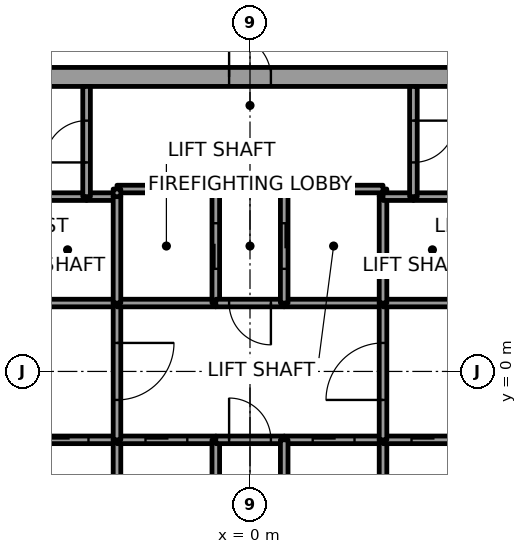
"""IFC4 building model, lengths in metres.
Left out: names, types, materials, properties, quantities, classifications, styles, units other than length and angle.
Written with IfcOpenShell. Run it as: python <this file> out.ifc"""

import sys

from ifc_helpers import new_model, si_unit, direction, frame, frame_2d, origin, place, context, subcontext, project, spatial, rectangle, extrude, element, fill, save


model = new_model("IFC4")
c1 = context("Model", 3, precision=1e-05, world=origin(), true_north=direction((0.0, 1.0)))
c2 = subcontext(c1, "Body", "Model", "MODEL_VIEW")
j1 = project(units=[si_unit("LENGTHUNIT", "METRE"), si_unit("PLANEANGLEUNIT", "RADIAN")], contexts=[c1])
p1 = place(None, origin())
s1 = spatial("IfcSite", under=j1, at=p1, CompositionType="ELEMENT")
p2 = place(p1, origin())
s2 = spatial("IfcBuilding", under=s1, at=p2, CompositionType="ELEMENT")
p3 = place(p2, frame((0.0, 0.0, 133.8)))
s3 = spatial("IfcBuildingStorey", under=s2, at=p3, CompositionType="ELEMENT", Elevation=133.8)
p4 = place(p3, frame((-11.0, 7.75, 0.0), z_axis=(0.0, 0.0, 1.0), x_axis=(1.0, 0.0, 0.0)))
e1 = element("IfcWall", 1, at=p4, inside=s3, PredefinedType="SHEAR", context=c2, shape_type="SweptSolid", body=[
    extrude(rectangle(XDim=22.0, YDim=0.5, at=frame_2d((11.0, 0.0))), origin(), (0.0, 0.0, 1.0), 4.0),
])
p5 = place(p4, frame((10.45, 0.0, 0.0)))
e2 = element("IfcOpeningElement", 2, at=p5, cuts=e1, PredefinedType="OPENING", context=c2, shape_type="SweptSolid", body=[
    extrude(rectangle(XDim=1.1, YDim=2.1, at=frame_2d((0.55, 1.05))), frame((0.0, 0.25, 0.0), z_axis=(0.0, -1.0, 0.0), x_axis=(1.0, 0.0, 0.0)), (0.0, 0.0, 1.0), 0.5),
])
p6 = place(p3, frame((-6.1, -1.8, 0.0), z_axis=(0.0, 0.0, 1.0), x_axis=(1.0, 0.0, 0.0)))
e3 = element("IfcWall", 3, at=p6, inside=s3, PredefinedType="SOLIDWALL", context=c2, shape_type="SweptSolid", body=[
    extrude(rectangle(XDim=2.6, YDim=0.2, at=frame_2d((1.3, 0.0))), origin(), (0.0, 0.0, 1.0), 3.85),
])
p7 = place(p6, frame((0.75, 0.0, 0.0)))
e4 = element("IfcOpeningElement", 4, at=p7, cuts=e3, PredefinedType="OPENING", context=c2, shape_type="SweptSolid", body=[
    extrude(rectangle(XDim=1.1, YDim=2.1, at=frame_2d((0.55, 1.05))), frame((0.0, 0.1, 0.0), z_axis=(0.0, -1.0, 0.0), x_axis=(1.0, 0.0, 0.0)), (0.0, 0.0, 1.0), 0.2),
])
p8 = place(p3, frame((-3.5, 1.8, 0.0), z_axis=(0.0, 0.0, 1.0), x_axis=(-1.0, 0.0, 0.0)))
e5 = element("IfcWall", 5, at=p8, inside=s3, PredefinedType="SOLIDWALL", context=c2, shape_type="SweptSolid", body=[
    extrude(rectangle(XDim=2.6, YDim=0.2, at=frame_2d((1.3, 0.0))), origin(), (0.0, 0.0, 1.0), 3.85),
])
p9 = place(p3, frame((-4.3, 4.6, 0.0), z_axis=(0.0, 0.0, 1.0), x_axis=(-1.0, 0.0, 0.0)))
e6 = element("IfcWall", 6, at=p9, inside=s3, PredefinedType="SOLIDWALL", context=c2, shape_type="SweptSolid", body=[
    extrude(rectangle(XDim=1.8, YDim=0.2, at=frame_2d((0.9, 0.0))), origin(), (0.0, 0.0, 1.0), 3.85),
])
p10 = place(p3, frame((-3.5, 4.6, 0.0), z_axis=(0.0, 0.0, 1.0), x_axis=(-1.0, 0.0, 0.0)))
e7 = element("IfcWall", 7, at=p10, inside=s3, PredefinedType="SOLIDWALL", context=c2, shape_type="SweptSolid", body=[
    extrude(rectangle(XDim=0.8, YDim=0.2, at=frame_2d((0.4, 0.0))), origin(), (0.0, 0.0, 1.0), 3.85),
])
p11 = place(p3, frame((-4.3, 4.6, 0.0), z_axis=(0.0, 0.0, 1.0), x_axis=(0.0, 1.0, 0.0)))
e8 = element("IfcWall", 8, at=p11, inside=s3, PredefinedType="SOLIDWALL", context=c2, shape_type="SweptSolid", body=[
    extrude(rectangle(XDim=2.9, YDim=0.2, at=frame_2d((1.45, 0.0))), origin(), (0.0, 0.0, 1.0), 3.85),
])
p12 = place(p11, frame((0.9, 0.0, 0.0)))
e9 = element("IfcOpeningElement", 9, at=p12, cuts=e8, PredefinedType="OPENING", context=c2, shape_type="SweptSolid", body=[
    extrude(rectangle(XDim=1.1, YDim=2.1, at=frame_2d((0.55, 1.05))), frame((0.0, 0.1, 0.0), z_axis=(0.0, -1.0, 0.0), x_axis=(1.0, 0.0, 0.0)), (0.0, 0.0, 1.0), 0.2),
])
p13 = place(p3, frame((-3.5, -4.6, 0.0), z_axis=(0.0, 0.0, 1.0), x_axis=(0.0, 1.0, 0.0)))
e10 = element("IfcWall", 10, at=p13, inside=s3, PredefinedType="SOLIDWALL", context=c2, shape_type="SweptSolid", body=[
    extrude(rectangle(XDim=2.8, YDim=0.2, at=frame_2d((1.4, 0.0))), origin(), (0.0, 0.0, 1.0), 3.85),
])
p14 = place(p3, frame((-3.5, -1.8, 0.0), z_axis=(0.0, 0.0, 1.0), x_axis=(1.0, 0.0, 0.0)))
e11 = element("IfcWall", 11, at=p14, inside=s3, PredefinedType="SOLIDWALL", context=c2, shape_type="SweptSolid", body=[
    extrude(rectangle(XDim=2.6, YDim=0.2, at=frame_2d((1.3, 0.0))), origin(), (0.0, 0.0, 1.0), 3.85),
])
p15 = place(p14, frame((0.75, 0.0, 0.0)))
e12 = element("IfcOpeningElement", 12, at=p15, cuts=e11, PredefinedType="OPENING", context=c2, shape_type="SweptSolid", body=[
    extrude(rectangle(XDim=1.1, YDim=2.1, at=frame_2d((0.55, 1.05))), frame((0.0, 0.1, 0.0), z_axis=(0.0, -1.0, 0.0), x_axis=(1.0, 0.0, 0.0)), (0.0, 0.0, 1.0), 0.2),
])
p16 = place(p3, frame((-3.5, 1.8, 0.0), z_axis=(0.0, 0.0, 1.0), x_axis=(0.0, -1.0, 0.0)))
e13 = element("IfcWall", 13, at=p16, inside=s3, PredefinedType="SOLIDWALL", context=c2, shape_type="SweptSolid", body=[
    extrude(rectangle(XDim=3.6, YDim=0.2, at=frame_2d((1.8, 0.0))), origin(), (0.0, 0.0, 1.0), 3.85),
])
p17 = place(p16, frame((1.05, 0.0, 0.0)))
e14 = element("IfcOpeningElement", 14, at=p17, cuts=e13, PredefinedType="OPENING", context=c2, shape_type="SweptSolid", body=[
    extrude(rectangle(XDim=1.5, YDim=2.1, at=frame_2d((0.75, 1.05))), frame((0.0, 0.1, 0.0), z_axis=(0.0, -1.0, 0.0), x_axis=(1.0, 0.0, 0.0)), (0.0, 0.0, 1.0), 0.2),
])
p18 = place(p3, frame((-0.9, 1.8, 0.0), z_axis=(0.0, 0.0, 1.0), x_axis=(-1.0, 0.0, 0.0)))
e15 = element("IfcWall", 15, at=p18, inside=s3, PredefinedType="SOLIDWALL", context=c2, shape_type="SweptSolid", body=[
    extrude(rectangle(XDim=2.6, YDim=0.2, at=frame_2d((1.3, 0.0))), origin(), (0.0, 0.0, 1.0), 3.85),
])
p19 = place(p3, frame((-3.5, 4.6, 0.0), z_axis=(0.0, 0.0, 1.0), x_axis=(0.0, -1.0, 0.0)))
e16 = element("IfcWall", 16, at=p19, inside=s3, PredefinedType="SOLIDWALL", context=c2, shape_type="SweptSolid", body=[
    extrude(rectangle(XDim=2.8, YDim=0.2, at=frame_2d((1.4, 0.0))), origin(), (0.0, 0.0, 1.0), 3.85),
])
p20 = place(p3, frame((-0.9, 1.8, 0.0), z_axis=(0.0, 0.0, 1.0), x_axis=(0.0, 1.0, 0.0)))
e17 = element("IfcWall", 17, at=p20, inside=s3, PredefinedType="SOLIDWALL", context=c2, shape_type="SweptSolid", body=[
    extrude(rectangle(XDim=3.0, YDim=0.2, at=frame_2d((1.5, 0.0))), origin(), (0.0, 0.0, 1.0), 3.85),
])
p21 = place(p20, frame((0.9, 0.0, 0.0)))
e18 = element("IfcOpeningElement", 18, at=p21, cuts=e17, PredefinedType="OPENING", context=c2, shape_type="SweptSolid", body=[
    extrude(rectangle(XDim=1.2, YDim=2.1, at=frame_2d((0.6, 1.05))), frame((0.0, 0.1, 0.0), z_axis=(0.0, -1.0, 0.0), x_axis=(1.0, 0.0, 0.0)), (0.0, 0.0, 1.0), 0.2),
])
p22 = place(p3, frame((-0.9, 4.8, 0.0), z_axis=(0.0, 0.0, 1.0), x_axis=(-1.0, 0.0, 0.0)))
e19 = element("IfcWall", 19, at=p22, inside=s3, PredefinedType="SOLIDWALL", context=c2, shape_type="SweptSolid", body=[
    extrude(rectangle(XDim=2.6, YDim=0.2, at=frame_2d((1.3, 0.0))), origin(), (0.0, 0.0, 1.0), 3.85),
])
p23 = place(p3, frame((-3.5, 4.8, 0.0), z_axis=(0.0, 0.0, 1.0), x_axis=(0.0, -1.0, 0.0)))
e20 = element("IfcWall", 20, at=p23, inside=s3, PredefinedType="SOLIDWALL", context=c2, shape_type="SweptSolid", body=[
    extrude(rectangle(XDim=0.2, YDim=0.2, at=frame_2d((0.1, 0.0))), origin(), (0.0, 0.0, 1.0), 3.85),
])
p24 = place(p3, frame((-0.9, -4.6, 0.0), z_axis=(0.0, 0.0, 1.0), x_axis=(0.0, 1.0, 0.0)))
e21 = element("IfcWall", 21, at=p24, inside=s3, PredefinedType="SOLIDWALL", context=c2, shape_type="SweptSolid", body=[
    extrude(rectangle(XDim=2.8, YDim=0.2, at=frame_2d((1.4, 0.0))), origin(), (0.0, 0.0, 1.0), 3.85),
])
p25 = place(p3, frame((-0.9, -1.8, 0.0), z_axis=(0.0, 0.0, 1.0), x_axis=(1.0, 0.0, 0.0)))
e22 = element("IfcWall", 22, at=p25, inside=s3, PredefinedType="SOLIDWALL", context=c2, shape_type="SweptSolid", body=[
    extrude(rectangle(XDim=1.8, YDim=0.2, at=frame_2d((0.9, 0.0))), origin(), (0.0, 0.0, 1.0), 3.85),
])
p26 = place(p25, frame((0.35, 0.0, 0.0)))
e23 = element("IfcOpeningElement", 23, at=p26, cuts=e22, PredefinedType="OPENING", context=c2, shape_type="SweptSolid", body=[
    extrude(rectangle(XDim=1.1, YDim=2.1, at=frame_2d((0.55, 1.05))), frame((0.0, 0.1, 0.0), z_axis=(0.0, -1.0, 0.0), x_axis=(1.0, 0.0, 0.0)), (0.0, 0.0, 1.0), 0.2),
])
p27 = place(p3, frame((0.9, 1.8, 0.0), z_axis=(0.0, 0.0, 1.0), x_axis=(-1.0, 0.0, 0.0)))
e24 = element("IfcWall", 24, at=p27, inside=s3, PredefinedType="SOLIDWALL", context=c2, shape_type="SweptSolid", body=[
    extrude(rectangle(XDim=1.8, YDim=0.2, at=frame_2d((0.9, 0.0))), origin(), (0.0, 0.0, 1.0), 3.85),
])
p28 = place(p27, frame((0.35, 0.0, 0.0)))
e25 = element("IfcOpeningElement", 25, at=p28, cuts=e24, PredefinedType="OPENING", context=c2, shape_type="SweptSolid", body=[
    extrude(rectangle(XDim=1.1, YDim=2.1, at=frame_2d((0.55, 1.05))), frame((0.0, 0.1, 0.0), z_axis=(0.0, -1.0, 0.0), x_axis=(1.0, 0.0, 0.0)), (0.0, 0.0, 1.0), 0.2),
])
p29 = place(p3, frame((0.9, -1.8, 0.0), z_axis=(0.0, 0.0, 1.0), x_axis=(1.0, 0.0, 0.0)))
e26 = element("IfcWall", 26, at=p29, inside=s3, PredefinedType="SOLIDWALL", context=c2, shape_type="SweptSolid", body=[
    extrude(rectangle(XDim=2.6, YDim=0.2, at=frame_2d((1.3, 0.0))), origin(), (0.0, 0.0, 1.0), 3.85),
])
p30 = place(p29, frame((0.75, 0.0, 0.0)))
e27 = element("IfcOpeningElement", 27, at=p30, cuts=e26, PredefinedType="OPENING", context=c2, shape_type="SweptSolid", body=[
    extrude(rectangle(XDim=1.1, YDim=2.1, at=frame_2d((0.55, 1.05))), frame((0.0, 0.1, 0.0), z_axis=(0.0, -1.0, 0.0), x_axis=(1.0, 0.0, 0.0)), (0.0, 0.0, 1.0), 0.2),
])
p31 = place(p3, frame((0.9, -1.8, 0.0), z_axis=(0.0, 0.0, 1.0), x_axis=(0.0, -1.0, 0.0)))
e28 = element("IfcWall", 28, at=p31, inside=s3, PredefinedType="SOLIDWALL", context=c2, shape_type="SweptSolid", body=[
    extrude(rectangle(XDim=2.8, YDim=0.2, at=frame_2d((1.4, 0.0))), origin(), (0.0, 0.0, 1.0), 3.85),
])
p32 = place(p3, frame((3.5, 1.8, 0.0), z_axis=(0.0, 0.0, 1.0), x_axis=(-1.0, 0.0, 0.0)))
e29 = element("IfcWall", 29, at=p32, inside=s3, PredefinedType="SOLIDWALL", context=c2, shape_type="SweptSolid", body=[
    extrude(rectangle(XDim=2.6, YDim=0.2, at=frame_2d((1.3, 0.0))), origin(), (0.0, 0.0, 1.0), 3.85),
])
p33 = place(p3, frame((3.5, 4.6, 0.0), z_axis=(0.0, 0.0, 1.0), x_axis=(0.0, 1.0, 0.0)))
e30 = element("IfcWall", 30, at=p33, inside=s3, PredefinedType="SOLIDWALL", context=c2, shape_type="SweptSolid", body=[
    extrude(rectangle(XDim=0.2, YDim=0.2, at=frame_2d((0.1, 0.0))), origin(), (0.0, 0.0, 1.0), 3.85),
])
p34 = place(p3, frame((3.5, 4.8, 0.0), z_axis=(0.0, 0.0, 1.0), x_axis=(-1.0, 0.0, 0.0)))
e31 = element("IfcWall", 31, at=p34, inside=s3, PredefinedType="SOLIDWALL", context=c2, shape_type="SweptSolid", body=[
    extrude(rectangle(XDim=2.6, YDim=0.2, at=frame_2d((1.3, 0.0))), origin(), (0.0, 0.0, 1.0), 3.85),
])
p35 = place(p3, frame((0.9, 4.8, 0.0), z_axis=(0.0, 0.0, 1.0), x_axis=(0.0, -1.0, 0.0)))
e32 = element("IfcWall", 32, at=p35, inside=s3, PredefinedType="SOLIDWALL", context=c2, shape_type="SweptSolid", body=[
    extrude(rectangle(XDim=3.0, YDim=0.2, at=frame_2d((1.5, 0.0))), origin(), (0.0, 0.0, 1.0), 3.85),
])
p36 = place(p35, frame((0.9, 0.0, 0.0)))
e33 = element("IfcOpeningElement", 33, at=p36, cuts=e32, PredefinedType="OPENING", context=c2, shape_type="SweptSolid", body=[
    extrude(rectangle(XDim=1.2, YDim=2.1, at=frame_2d((0.6, 1.05))), frame((0.0, 0.1, 0.0), z_axis=(0.0, -1.0, 0.0), x_axis=(1.0, 0.0, 0.0)), (0.0, 0.0, 1.0), 0.2),
])
p37 = place(p3, frame((3.5, -4.6, 0.0), z_axis=(0.0, 0.0, 1.0), x_axis=(0.0, 1.0, 0.0)))
e34 = element("IfcWall", 34, at=p37, inside=s3, PredefinedType="SOLIDWALL", context=c2, shape_type="SweptSolid", body=[
    extrude(rectangle(XDim=2.8, YDim=0.2, at=frame_2d((1.4, 0.0))), origin(), (0.0, 0.0, 1.0), 3.85),
])
p38 = place(p3, frame((3.5, -1.8, 0.0), z_axis=(0.0, 0.0, 1.0), x_axis=(1.0, 0.0, 0.0)))
e35 = element("IfcWall", 35, at=p38, inside=s3, PredefinedType="SOLIDWALL", context=c2, shape_type="SweptSolid", body=[
    extrude(rectangle(XDim=2.6, YDim=0.2, at=frame_2d((1.3, 0.0))), origin(), (0.0, 0.0, 1.0), 3.85),
])
p39 = place(p38, frame((0.75, 0.0, 0.0)))
e36 = element("IfcOpeningElement", 36, at=p39, cuts=e35, PredefinedType="OPENING", context=c2, shape_type="SweptSolid", body=[
    extrude(rectangle(XDim=1.1, YDim=2.1, at=frame_2d((0.55, 1.05))), frame((0.0, 0.1, 0.0), z_axis=(0.0, -1.0, 0.0), x_axis=(1.0, 0.0, 0.0)), (0.0, 0.0, 1.0), 0.2),
])
p40 = place(p3, frame((3.5, -1.8, 0.0), z_axis=(0.0, 0.0, 1.0), x_axis=(0.0, 1.0, 0.0)))
e37 = element("IfcWall", 37, at=p40, inside=s3, PredefinedType="SOLIDWALL", context=c2, shape_type="SweptSolid", body=[
    extrude(rectangle(XDim=3.6, YDim=0.2, at=frame_2d((1.8, 0.0))), origin(), (0.0, 0.0, 1.0), 3.85),
])
p41 = place(p40, frame((1.05, 0.0, 0.0)))
e38 = element("IfcOpeningElement", 38, at=p41, cuts=e37, PredefinedType="OPENING", context=c2, shape_type="SweptSolid", body=[
    extrude(rectangle(XDim=1.5, YDim=2.1, at=frame_2d((0.75, 1.05))), frame((0.0, 0.1, 0.0), z_axis=(0.0, -1.0, 0.0), x_axis=(1.0, 0.0, 0.0)), (0.0, 0.0, 1.0), 0.2),
])
p42 = place(p3, frame((6.1, 1.8, 0.0), z_axis=(0.0, 0.0, 1.0), x_axis=(-1.0, 0.0, 0.0)))
e39 = element("IfcWall", 39, at=p42, inside=s3, PredefinedType="SOLIDWALL", context=c2, shape_type="SweptSolid", body=[
    extrude(rectangle(XDim=2.6, YDim=0.2, at=frame_2d((1.3, 0.0))), origin(), (0.0, 0.0, 1.0), 3.85),
])
p43 = place(p3, frame((3.5, 1.8, 0.0), z_axis=(0.0, 0.0, 1.0), x_axis=(0.0, 1.0, 0.0)))
e40 = element("IfcWall", 40, at=p43, inside=s3, PredefinedType="SOLIDWALL", context=c2, shape_type="SweptSolid", body=[
    extrude(rectangle(XDim=2.8, YDim=0.2, at=frame_2d((1.4, 0.0))), origin(), (0.0, 0.0, 1.0), 3.85),
])
p44 = place(p3, frame((4.3, 4.6, 0.0), z_axis=(0.0, 0.0, 1.0), x_axis=(-1.0, 0.0, 0.0)))
e41 = element("IfcWall", 41, at=p44, inside=s3, PredefinedType="SOLIDWALL", context=c2, shape_type="SweptSolid", body=[
    extrude(rectangle(XDim=0.8, YDim=0.2, at=frame_2d((0.4, 0.0))), origin(), (0.0, 0.0, 1.0), 3.85),
])
p45 = place(p3, frame((6.1, 4.6, 0.0), z_axis=(0.0, 0.0, 1.0), x_axis=(-1.0, 0.0, 0.0)))
e42 = element("IfcWall", 42, at=p45, inside=s3, PredefinedType="SOLIDWALL", context=c2, shape_type="SweptSolid", body=[
    extrude(rectangle(XDim=1.8, YDim=0.2, at=frame_2d((0.9, 0.0))), origin(), (0.0, 0.0, 1.0), 3.85),
])
p46 = place(p3, frame((4.3, 7.5, 0.0), z_axis=(0.0, 0.0, 1.0), x_axis=(0.0, -1.0, 0.0)))
e43 = element("IfcWall", 43, at=p46, inside=s3, PredefinedType="SOLIDWALL", context=c2, shape_type="SweptSolid", body=[
    extrude(rectangle(XDim=2.9, YDim=0.2, at=frame_2d((1.45, 0.0))), origin(), (0.0, 0.0, 1.0), 3.85),
])
p47 = place(p46, frame((0.9, 0.0, 0.0)))
e44 = element("IfcOpeningElement", 44, at=p47, cuts=e43, PredefinedType="OPENING", context=c2, shape_type="SweptSolid", body=[
    extrude(rectangle(XDim=1.1, YDim=2.1, at=frame_2d((0.55, 1.05))), frame((0.0, 0.1, 0.0), z_axis=(0.0, -1.0, 0.0), x_axis=(1.0, 0.0, 0.0)), (0.0, 0.0, 1.0), 0.2),
])
p48 = place(p7, origin())
e45 = element("IfcDoor", 45, at=p48, inside=s3, OperationType="SLIDING_TO_LEFT", PredefinedType="DOOR", context=c2, shape_type="SweptSolid", body=[
    extrude(rectangle(XDim=1.1, YDim=2.1, at=frame_2d((0.55, 1.05))), frame((0.0, 0.025, 0.0), z_axis=(0.0, -1.0, 0.0), x_axis=(1.0, 0.0, 0.0)), (0.0, 0.0, 1.0), 0.05),
])
fill(e4, e45)
p49 = place(p15, origin())
e46 = element("IfcDoor", 46, at=p49, inside=s3, OperationType="SLIDING_TO_LEFT", PredefinedType="DOOR", context=c2, shape_type="SweptSolid", body=[
    extrude(rectangle(XDim=1.1, YDim=2.1, at=frame_2d((0.55, 1.05))), frame((0.0, 0.025, 0.0), z_axis=(0.0, -1.0, 0.0), x_axis=(1.0, 0.0, 0.0)), (0.0, 0.0, 1.0), 0.05),
])
fill(e12, e46)
p50 = place(p30, origin())
e47 = element("IfcDoor", 47, at=p50, inside=s3, OperationType="SLIDING_TO_LEFT", PredefinedType="DOOR", context=c2, shape_type="SweptSolid", body=[
    extrude(rectangle(XDim=1.1, YDim=2.1, at=frame_2d((0.55, 1.05))), frame((0.0, 0.025, 0.0), z_axis=(0.0, -1.0, 0.0), x_axis=(1.0, 0.0, 0.0)), (0.0, 0.0, 1.0), 0.05),
])
fill(e27, e47)
p51 = place(p39, origin())
e48 = element("IfcDoor", 48, at=p51, inside=s3, OperationType="SLIDING_TO_LEFT", PredefinedType="DOOR", context=c2, shape_type="SweptSolid", body=[
    extrude(rectangle(XDim=1.1, YDim=2.1, at=frame_2d((0.55, 1.05))), frame((0.0, 0.025, 0.0), z_axis=(0.0, -1.0, 0.0), x_axis=(1.0, 0.0, 0.0)), (0.0, 0.0, 1.0), 0.05),
])
fill(e36, e48)
p52 = place(p21, origin())
e49 = element("IfcDoor", 49, at=p52, inside=s3, OperationType="SLIDING_TO_LEFT", PredefinedType="DOOR", context=c2, shape_type="SweptSolid", body=[
    extrude(rectangle(XDim=1.2, YDim=2.1, at=frame_2d((0.6, 1.05))), frame((0.0, 0.025, 0.0), z_axis=(0.0, -1.0, 0.0), x_axis=(1.0, 0.0, 0.0)), (0.0, 0.0, 1.0), 0.05),
])
fill(e18, e49)
p53 = place(p36, origin())
e50 = element("IfcDoor", 50, at=p53, inside=s3, OperationType="SLIDING_TO_LEFT", PredefinedType="DOOR", context=c2, shape_type="SweptSolid", body=[
    extrude(rectangle(XDim=1.2, YDim=2.1, at=frame_2d((0.6, 1.05))), frame((0.0, 0.025, 0.0), z_axis=(0.0, -1.0, 0.0), x_axis=(1.0, 0.0, 0.0)), (0.0, 0.0, 1.0), 0.05),
])
fill(e33, e50)
p54 = place(p17, origin())
e51 = element("IfcDoor", 51, at=p54, inside=s3, OperationType="DOUBLE_DOOR_SINGLE_SWING", PredefinedType="DOOR", context=c2, shape_type="SweptSolid", body=[
    extrude(rectangle(XDim=1.5, YDim=2.1, at=frame_2d((0.75, 1.05))), frame((0.0, 0.025, 0.0), z_axis=(0.0, -1.0, 0.0), x_axis=(1.0, 0.0, 0.0)), (0.0, 0.0, 1.0), 0.05),
])
fill(e14, e51)
p55 = place(p41, origin())
e52 = element("IfcDoor", 52, at=p55, inside=s3, OperationType="DOUBLE_DOOR_SINGLE_SWING", PredefinedType="DOOR", context=c2, shape_type="SweptSolid", body=[
    extrude(rectangle(XDim=1.5, YDim=2.1, at=frame_2d((0.75, 1.05))), frame((0.0, 0.025, 0.0), z_axis=(0.0, -1.0, 0.0), x_axis=(1.0, 0.0, 0.0)), (0.0, 0.0, 1.0), 0.05),
])
fill(e38, e52)
p56 = place(p28, origin())
e53 = element("IfcDoor", 53, at=p56, inside=s3, OperationType="SINGLE_SWING_RIGHT", PredefinedType="DOOR", context=c2, shape_type="SweptSolid", body=[
    extrude(rectangle(XDim=1.1, YDim=2.1, at=frame_2d((0.55, 1.05))), frame((0.0, 0.025, 0.0), z_axis=(0.0, -1.0, 0.0), x_axis=(1.0, 0.0, 0.0)), (0.0, 0.0, 1.0), 0.05),
])
fill(e25, e53)
p57 = place(p26, origin())
e54 = element("IfcDoor", 54, at=p57, inside=s3, OperationType="SINGLE_SWING_RIGHT", PredefinedType="DOOR", context=c2, shape_type="SweptSolid", body=[
    extrude(rectangle(XDim=1.1, YDim=2.1, at=frame_2d((0.55, 1.05))), frame((0.0, 0.025, 0.0), z_axis=(0.0, -1.0, 0.0), x_axis=(1.0, 0.0, 0.0)), (0.0, 0.0, 1.0), 0.05),
])
fill(e23, e54)
p58 = place(p12, origin())
e55 = element("IfcDoor", 55, at=p58, inside=s3, OperationType="SINGLE_SWING_RIGHT", PredefinedType="DOOR", context=c2, shape_type="SweptSolid", body=[
    extrude(rectangle(XDim=1.1, YDim=2.1, at=frame_2d((0.55, 1.05))), frame((0.0, 0.025, 0.0), z_axis=(0.0, -1.0, 0.0), x_axis=(1.0, 0.0, 0.0)), (0.0, 0.0, 1.0), 0.05),
])
fill(e9, e55)
p59 = place(p47, origin())
e56 = element("IfcDoor", 56, at=p59, inside=s3, OperationType="SINGLE_SWING_RIGHT", PredefinedType="DOOR", context=c2, shape_type="SweptSolid", body=[
    extrude(rectangle(XDim=1.1, YDim=2.1, at=frame_2d((0.55, 1.05))), frame((0.0, 0.025, 0.0), z_axis=(0.0, -1.0, 0.0), x_axis=(1.0, 0.0, 0.0)), (0.0, 0.0, 1.0), 0.05),
])
fill(e44, e56)
p60 = place(p5, origin())
e57 = element("IfcDoor", 57, at=p60, inside=s3, OperationType="SINGLE_SWING_RIGHT", PredefinedType="DOOR", context=c2, shape_type="SweptSolid", body=[
    extrude(rectangle(XDim=1.1, YDim=2.1, at=frame_2d((0.55, 1.05))), frame((0.0, 0.025, 0.0), z_axis=(0.0, -1.0, 0.0), x_axis=(1.0, 0.0, 0.0)), (0.0, 0.0, 1.0), 0.05),
])
fill(e2, e57)
save(model, sys.argv[1])
